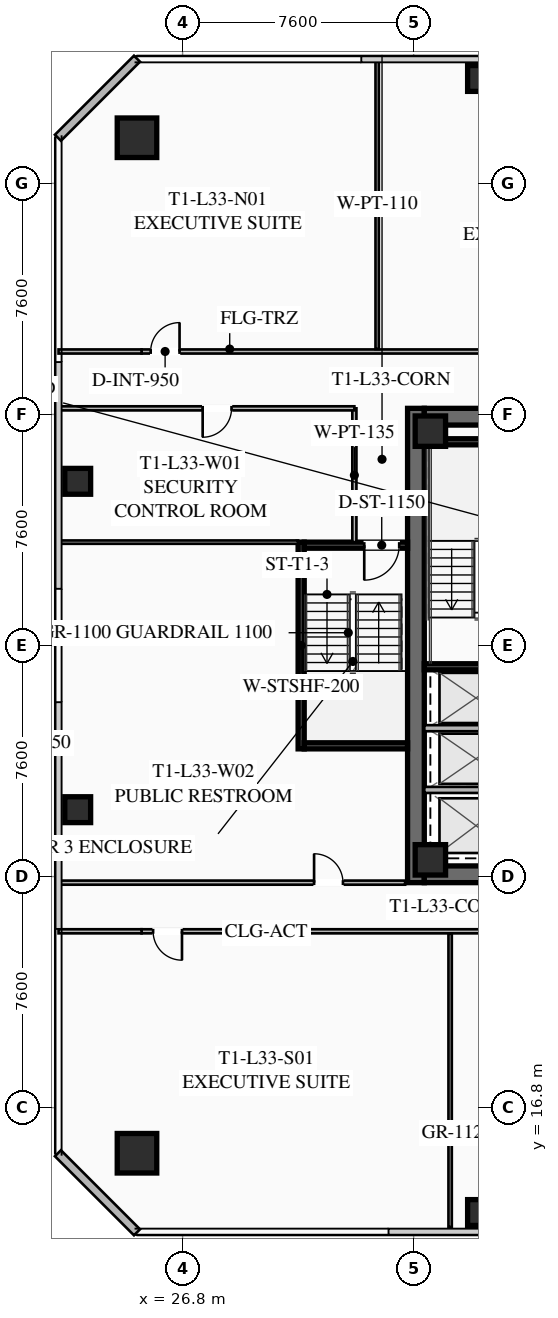
"""IFC4 building model, lengths in metres.
Left out: names, types, materials, properties, quantities, classifications, styles, units other than length and angle.
Written with IfcOpenShell. Run it as: python <this file> out.ifc"""

import sys

from ifc_helpers import new_model, si_unit, direction, frame, frame_2d, origin, origin_2d, place, context, subcontext, project, spatial, rectangle, hollow_rectangle, extrude, element, fill, save


model = new_model("IFC4")
c1 = context("Model", 3, precision=1e-05, world=origin(), true_north=direction((0.0, 1.0)))
c2 = subcontext(c1, "Body", "Model", "MODEL_VIEW")
j1 = project(units=[si_unit("LENGTHUNIT", "METRE"), si_unit("PLANEANGLEUNIT", "RADIAN")], contexts=[c1])
p1 = place(None, origin())
s1 = spatial("IfcSite", under=j1, at=p1, CompositionType="ELEMENT")
p2 = place(p1, origin())
s2 = spatial("IfcBuilding", under=s1, at=p2, CompositionType="ELEMENT")
p3 = place(p2, frame((0.0, 0.0, 125.05)))
s3 = spatial("IfcBuildingStorey", under=s2, at=p3, CompositionType="ELEMENT", Elevation=125.05)
p4 = place(p3, frame((34.475, 24.2, 0.0), z_axis=(0.0, 0.0, 1.0), x_axis=(0.0, 1.0, 0.0)))
e1 = element("IfcWall", 1, at=p4, inside=s3, PredefinedType="SHEAR", context=c2, shape_type="SweptSolid", body=[
    extrude(rectangle(XDim=15.6, YDim=0.55, at=frame_2d((7.8, 0.0))), origin(), (0.0, 0.0, 1.0), 3.55),
])
p5 = place(p3, frame((49.25, 24.475, 0.0), z_axis=(0.0, 0.0, 1.0), x_axis=(-1.0, 0.0, 0.0)))
e2 = element("IfcWall", 2, at=p5, inside=s3, PredefinedType="SHEAR", context=c2, shape_type="SweptSolid", body=[
    extrude(rectangle(XDim=14.5, YDim=0.55, at=frame_2d((7.25, 0.0))), origin(), (0.0, 0.0, 1.0), 3.55),
])
p6 = place(p5, frame((8.95, 0.0, 0.0)))
e3 = element("IfcOpeningElement", 3, at=p6, cuts=e2, PredefinedType="OPENING", context=c2, shape_type="SweptSolid", body=[
    extrude(rectangle(XDim=1.25, YDim=2.25, at=frame_2d((0.625, 1.125))), frame((0.0, 0.285, 0.0), z_axis=(0.0, -1.0, 0.0), x_axis=(1.0, 0.0, 0.0)), (0.0, 0.0, 1.0), 0.57),
])
p7 = place(p5, frame((3.9, 0.0, 0.0)))
e4 = element("IfcOpeningElement", 4, at=p7, cuts=e2, PredefinedType="OPENING", context=c2, shape_type="SweptSolid", body=[
    extrude(rectangle(XDim=1.25, YDim=2.25, at=frame_2d((0.625, 1.125))), frame((0.0, 0.285, 0.0), z_axis=(0.0, -1.0, 0.0), x_axis=(1.0, 0.0, 0.0)), (0.0, 0.0, 1.0), 0.57),
])
p8 = place(p3, frame((34.75, 39.525, 0.0), z_axis=(0.0, 0.0, 1.0), x_axis=(1.0, 0.0, 0.0)))
e5 = element("IfcWall", 5, at=p8, inside=s3, PredefinedType="SHEAR", context=c2, shape_type="SweptSolid", body=[
    extrude(rectangle(XDim=14.5, YDim=0.55, at=frame_2d((7.25, 0.0))), origin(), (0.0, 0.0, 1.0), 3.55),
])
p9 = place(p8, frame((4.3, 0.0, 0.0)))
e6 = element("IfcOpeningElement", 6, at=p9, cuts=e5, PredefinedType="OPENING", context=c2, shape_type="SweptSolid", body=[
    extrude(rectangle(XDim=1.25, YDim=2.25, at=frame_2d((0.625, 1.125))), frame((0.0, 0.285, 0.0), z_axis=(0.0, -1.0, 0.0), x_axis=(1.0, 0.0, 0.0)), (0.0, 0.0, 1.0), 0.57),
])
p10 = place(p8, frame((9.35, 0.0, 0.0)))
e7 = element("IfcOpeningElement", 7, at=p10, cuts=e5, PredefinedType="OPENING", context=c2, shape_type="SweptSolid", body=[
    extrude(rectangle(XDim=1.25, YDim=2.25, at=frame_2d((0.625, 1.125))), frame((0.0, 0.285, 0.0), z_axis=(0.0, -1.0, 0.0), x_axis=(1.0, 0.0, 0.0)), (0.0, 0.0, 1.0), 0.57),
])
for number, where, z_axis, x_axis in (
    (8, (34.95, 24.95, 0.0), (0.0, 0.0, 1.0), (1.0, 0.0, 0.0)),
    (9, (34.95, 39.05, 0.0), (0.0, 0.0, 1.0), (1.0, 0.0, 0.0)),
):
    element("IfcColumn", number, at=place(p3, frame(where, z_axis=z_axis, x_axis=x_axis)), inside=s3, PredefinedType="COLUMN", context=c2, shape_type="SweptSolid", body=[
        extrude(hollow_rectangle(XDim=1.0, YDim=1.0, WallThickness=0.04, at=origin_2d()), origin(), (0.0, 0.0, 1.0), 3.37),
    ])
for number, where, z_axis, x_axis in (
    (10, (25.3, 15.3, 0.0), (0.0, 0.0, 1.0), (1.0, 0.0, 0.0)),
    (11, (25.3, 48.7, 0.0), (0.0, 0.0, 1.0), (1.0, 0.0, 0.0)),
):
    element("IfcColumn", number, at=place(p3, frame(where, z_axis=z_axis, x_axis=x_axis)), inside=s3, PredefinedType="COLUMN", context=c2, shape_type="SweptSolid", body=[
        extrude(hollow_rectangle(XDim=1.3, YDim=1.3, WallThickness=0.05, at=origin_2d()), origin(), (0.0, 0.0, 1.0), 3.37),
    ])
for number, where, z_axis, x_axis in (
    (12, (36.6, 13.35, 0.0), (0.0, 0.0, 1.0), (1.0, 0.0, 0.0)),
    (13, (36.6, 50.65, 0.0), (0.0, 0.0, 1.0), (1.0, 0.0, 0.0)),
    (14, (23.35, 37.4, 0.0), (0.0, 0.0, 1.0), (1.0, 0.0, 0.0)),
    (15, (23.35, 26.6, 0.0), (0.0, 0.0, 1.0), (1.0, 0.0, 0.0)),
):
    element("IfcColumn", number, at=place(p3, frame(where, z_axis=z_axis, x_axis=x_axis)), inside=s3, PredefinedType="COLUMN", context=c2, shape_type="SweptSolid", body=[
        extrude(hollow_rectangle(XDim=0.85, YDim=0.85, WallThickness=0.035, at=origin_2d()), origin(), (0.0, 0.0, 1.0), 3.37),
    ])
for number, where, z_axis, x_axis in (
    (16, (25.3, 12.7, 0.0), (0.0, 0.0, 1.0), (-0.707, 0.707, 0.0)),
    (17, (22.7, 48.7, 0.0), (0.0, 0.0, 1.0), (0.707, 0.707, 0.0)),
):
    element("IfcWall", number, at=place(p3, frame(where, z_axis=z_axis, x_axis=x_axis)), inside=s3, PredefinedType="SOLIDWALL", context=c2, shape_type="SweptSolid", body=[
        extrude(rectangle(XDim=3.677, YDim=0.28, at=frame_2d((1.838, 0.0))), origin(), (0.0, 0.0, 1.0), 3.37),
    ])
for number, where, z_axis, x_axis in (
    (18, (34.75, 31.3, 0.0), (0.0, 0.0, 1.0), (1.0, 0.0, 0.0)),
    (19, (34.75, 38.7, 0.0), (0.0, 0.0, 1.0), (1.0, 0.0, 0.0)),
):
    element("IfcWall", number, at=place(p3, frame(where, z_axis=z_axis, x_axis=x_axis)), inside=s3, PredefinedType="SHEAR", context=c2, shape_type="SweptSolid", body=[
        extrude(rectangle(XDim=3.55, YDim=0.2, at=frame_2d((1.775, 0.0))), origin(), (0.0, 0.0, 1.0), 3.37),
    ])
for number, where, z_axis, x_axis in (
    (20, (34.75, 27.25, 0.0), (0.0, 0.0, 1.0), (1.0, 0.0, 0.0)),
    (21, (34.75, 29.28, 0.0), (0.0, 0.0, 1.0), (1.0, 0.0, 0.0)),
):
    element("IfcWall", number, at=place(p3, frame(where, z_axis=z_axis, x_axis=x_axis)), inside=s3, PredefinedType="SOLIDWALL", context=c2, shape_type="SweptSolid", body=[
        extrude(rectangle(XDim=3.2, YDim=0.2, at=frame_2d((1.6, 0.0))), origin(), (0.0, 0.0, 1.0), 3.37),
    ])
p11 = place(p3, frame((30.7, 28.6, 0.0), z_axis=(0.0, 0.0, 1.0), x_axis=(0.0, 1.0, 0.0)))
e22 = element("IfcWall", 22, at=p11, inside=s3, PredefinedType="SHEAR", context=c2, shape_type="SweptSolid", body=[
    extrude(rectangle(XDim=6.8, YDim=0.2, at=frame_2d((3.4, 0.0))), origin(), (0.0, 0.0, 1.0), 3.37),
])
p12 = place(p3, frame((34.2, 35.3, 0.0), z_axis=(0.0, 0.0, 1.0), x_axis=(-1.0, 0.0, 0.0)))
e23 = element("IfcWall", 23, at=p12, inside=s3, PredefinedType="SHEAR", context=c2, shape_type="SweptSolid", body=[
    extrude(rectangle(XDim=3.4, YDim=0.2, at=frame_2d((1.7, 0.0))), origin(), (0.0, 0.0, 1.0), 3.37),
])
p13 = place(p12, frame((0.275, 0.0, 0.0)))
e24 = element("IfcOpeningElement", 24, at=p13, cuts=e23, PredefinedType="OPENING", context=c2, shape_type="SweptSolid", body=[
    extrude(rectangle(XDim=1.15, YDim=2.2, at=frame_2d((0.575, 1.1))), frame((0.0, 0.11, 0.0), z_axis=(0.0, -1.0, 0.0), x_axis=(1.0, 0.0, 0.0)), (0.0, 0.0, 1.0), 0.22),
])
p14 = place(p3, frame((30.8, 28.7, 0.0), z_axis=(0.0, 0.0, 1.0), x_axis=(1.0, 0.0, 0.0)))
e25 = element("IfcWall", 25, at=p14, inside=s3, PredefinedType="SHEAR", context=c2, shape_type="SweptSolid", body=[
    extrude(rectangle(XDim=3.4, YDim=0.2, at=frame_2d((1.7, 0.0))), origin(), (0.0, 0.0, 1.0), 3.37),
])
p15 = place(p3, frame((32.45, 35.4, 0.0), z_axis=(0.0, 0.0, 1.0), x_axis=(0.0, 1.0, 0.0)))
e26 = element("IfcWall", 26, at=p15, inside=s3, PredefinedType="PARTITIONING", context=c2, shape_type="SweptSolid", body=[
    extrude(rectangle(XDim=4.4, YDim=0.135, at=frame_2d((2.2, 0.0))), origin(), (0.0, 0.0, 1.0), 2.723),
])
p16 = place(p3, frame((25.45, 41.67, 0.0), z_axis=(0.0, 0.0, 1.0), x_axis=(1.0, 0.0, 0.0)))
e27 = element("IfcWall", 27, at=p16, inside=s3, PredefinedType="PARTITIONING", context=c2, shape_type="SweptSolid", body=[
    extrude(rectangle(XDim=33.1, YDim=0.135, at=frame_2d((16.55, 0.0))), origin(), (0.0, 0.0, 1.0), 2.723),
])
p17 = place(p16, frame((0.3, 0.0, 0.0)))
e28 = element("IfcOpeningElement", 28, at=p17, cuts=e27, PredefinedType="OPENING", context=c2, shape_type="SweptSolid", body=[
    extrude(rectangle(XDim=0.95, YDim=2.05, at=frame_2d((0.475, 1.025))), frame((0.0, 0.077, 0.0), z_axis=(0.0, -1.0, 0.0), x_axis=(1.0, 0.0, 0.0)), (0.0, 0.0, 1.0), 0.155),
])
p18 = place(p16, frame((16.363, 0.0, 0.0)))
e29 = element("IfcOpeningElement", 29, at=p18, cuts=e27, PredefinedType="OPENING", context=c2, shape_type="SweptSolid", body=[
    extrude(rectangle(XDim=0.95, YDim=2.05, at=frame_2d((0.475, 1.025))), frame((0.0, 0.077, 0.0), z_axis=(0.0, -1.0, 0.0), x_axis=(1.0, 0.0, 0.0)), (0.0, 0.0, 1.0), 0.155),
])
p19 = place(p16, frame((31.85, 0.0, 0.0)))
e30 = element("IfcOpeningElement", 30, at=p19, cuts=e27, PredefinedType="OPENING", context=c2, shape_type="SweptSolid", body=[
    extrude(rectangle(XDim=0.95, YDim=2.05, at=frame_2d((0.475, 1.025))), frame((0.0, 0.077, 0.0), z_axis=(0.0, -1.0, 0.0), x_axis=(1.0, 0.0, 0.0)), (0.0, 0.0, 1.0), 0.155),
])
p20 = place(p3, frame((22.72, 41.67, 0.0), z_axis=(0.0, 0.0, 1.0), x_axis=(1.0, 0.0, 0.0)))
e31 = element("IfcWall", 31, at=p20, inside=s3, PredefinedType="PARTITIONING", context=c2, shape_type="SweptSolid", body=[
    extrude(rectangle(XDim=2.73, YDim=0.135, at=frame_2d((1.365, 0.0))), origin(), (0.0, 0.0, 1.0), 2.723),
])
p21 = place(p3, frame((33.2, 41.75, 0.0), z_axis=(0.0, 0.0, 1.0), x_axis=(0.0, 1.0, 0.0)))
e32 = element("IfcWall", 32, at=p21, inside=s3, PredefinedType="PARTITIONING", context=c2, shape_type="SweptSolid", body=[
    extrude(rectangle(XDim=9.53, YDim=0.11, at=frame_2d((4.765, 0.0))), origin(), (0.0, 0.0, 1.0), 2.723),
])
p22 = place(p3, frame((58.55, 22.6, 0.0), z_axis=(0.0, 0.0, 1.0), x_axis=(-1.0, 0.0, 0.0)))
e33 = element("IfcWall", 33, at=p22, inside=s3, PredefinedType="PARTITIONING", context=c2, shape_type="SweptSolid", body=[
    extrude(rectangle(XDim=33.1, YDim=0.135, at=frame_2d((16.55, 0.0))), origin(), (0.0, 0.0, 1.0), 2.723),
])
p23 = place(p22, frame((31.77, 0.0, 0.0)))
e34 = element("IfcOpeningElement", 34, at=p23, cuts=e33, PredefinedType="OPENING", context=c2, shape_type="SweptSolid", body=[
    extrude(rectangle(XDim=0.95, YDim=2.05, at=frame_2d((0.475, 1.025))), frame((0.0, 0.077, 0.0), z_axis=(0.0, -1.0, 0.0), x_axis=(1.0, 0.0, 0.0)), (0.0, 0.0, 1.0), 0.155),
])
p24 = place(p22, frame((15.838, 0.0, 0.0)))
e35 = element("IfcOpeningElement", 35, at=p24, cuts=e33, PredefinedType="OPENING", context=c2, shape_type="SweptSolid", body=[
    extrude(rectangle(XDim=0.95, YDim=2.05, at=frame_2d((0.475, 1.025))), frame((0.0, 0.077, 0.0), z_axis=(0.0, -1.0, 0.0), x_axis=(1.0, 0.0, 0.0)), (0.0, 0.0, 1.0), 0.155),
])
p25 = place(p22, frame((0.38, 0.0, 0.0)))
e36 = element("IfcOpeningElement", 36, at=p25, cuts=e33, PredefinedType="OPENING", context=c2, shape_type="SweptSolid", body=[
    extrude(rectangle(XDim=0.95, YDim=2.05, at=frame_2d((0.475, 1.025))), frame((0.0, 0.077, 0.0), z_axis=(0.0, -1.0, 0.0), x_axis=(1.0, 0.0, 0.0)), (0.0, 0.0, 1.0), 0.155),
])
p26 = place(p3, frame((22.72, 22.6, 0.0), z_axis=(0.0, 0.0, 1.0), x_axis=(1.0, 0.0, 0.0)))
e37 = element("IfcWall", 37, at=p26, inside=s3, PredefinedType="PARTITIONING", context=c2, shape_type="SweptSolid", body=[
    extrude(rectangle(XDim=2.73, YDim=0.135, at=frame_2d((1.365, 0.0))), origin(), (0.0, 0.0, 1.0), 2.723),
])
p27 = place(p3, frame((35.6, 12.87, 0.0), z_axis=(0.0, 0.0, 1.0), x_axis=(0.0, 1.0, 0.0)))
e38 = element("IfcWall", 38, at=p27, inside=s3, PredefinedType="PARTITIONING", context=c2, shape_type="SweptSolid", body=[
    extrude(rectangle(XDim=9.65, YDim=0.11, at=frame_2d((4.825, 0.0))), origin(), (0.0, 0.0, 1.0), 2.723),
])
p28 = place(p3, frame((32.45, 39.8, 0.0), z_axis=(0.0, 0.0, 1.0), x_axis=(-1.0, 0.0, 0.0)))
e39 = element("IfcWall", 39, at=p28, inside=s3, PredefinedType="PARTITIONING", context=c2, shape_type="SweptSolid", body=[
    extrude(rectangle(XDim=9.73, YDim=0.135, at=frame_2d((4.865, 0.0))), origin(), (0.0, 0.0, 1.0), 2.723),
])
p29 = place(p28, frame((4.04, 0.0, 0.0)))
e40 = element("IfcOpeningElement", 40, at=p29, cuts=e39, PredefinedType="OPENING", context=c2, shape_type="SweptSolid", body=[
    extrude(rectangle(XDim=0.95, YDim=2.05, at=frame_2d((0.475, 1.025))), frame((0.0, 0.077, 0.0), z_axis=(0.0, -1.0, 0.0), x_axis=(1.0, 0.0, 0.0)), (0.0, 0.0, 1.0), 0.155),
])
p30 = place(p3, frame((22.72, 24.2, 0.0), z_axis=(0.0, 0.0, 1.0), x_axis=(1.0, 0.0, 0.0)))
e41 = element("IfcWall", 41, at=p30, inside=s3, PredefinedType="PARTITIONING", context=c2, shape_type="SweptSolid", body=[
    extrude(rectangle(XDim=11.4, YDim=0.135, at=frame_2d((5.7, 0.0))), origin(), (0.0, 0.0, 1.0), 2.723),
])
p31 = place(p30, frame((8.405, 0.0, 0.0)))
e42 = element("IfcOpeningElement", 42, at=p31, cuts=e41, PredefinedType="OPENING", context=c2, shape_type="SweptSolid", body=[
    extrude(rectangle(XDim=0.95, YDim=2.05, at=frame_2d((0.475, 1.025))), frame((0.0, 0.077, 0.0), z_axis=(0.0, -1.0, 0.0), x_axis=(1.0, 0.0, 0.0)), (0.0, 0.0, 1.0), 0.155),
])
p32 = place(p3, frame((30.6, 35.4, 0.0), z_axis=(0.0, 0.0, 1.0), x_axis=(-1.0, 0.0, 0.0)))
e43 = element("IfcWall", 43, at=p32, inside=s3, PredefinedType="PARTITIONING", context=c2, shape_type="SweptSolid", body=[
    extrude(rectangle(XDim=7.88, YDim=0.11, at=frame_2d((3.94, 0.0))), origin(), (0.0, 0.0, 1.0), 2.723),
])
p33 = place(p13, origin())
e44 = element("IfcDoor", 44, at=p33, inside=s3, OperationType="SINGLE_SWING_RIGHT", PredefinedType="DOOR", context=c2, shape_type="SweptSolid", body=[
    extrude(rectangle(XDim=1.15, YDim=2.2, at=frame_2d((0.575, 1.1))), frame((0.0, 0.025, 0.0), z_axis=(0.0, -1.0, 0.0), x_axis=(1.0, 0.0, 0.0)), (0.0, 0.0, 1.0), 0.05),
])
fill(e24, e44)
p34 = place(p17, origin())
e45 = element("IfcDoor", 45, at=p34, inside=s3, OperationType="SINGLE_SWING_RIGHT", PredefinedType="DOOR", context=c2, shape_type="SweptSolid", body=[
    extrude(rectangle(XDim=0.95, YDim=2.05, at=frame_2d((0.475, 1.025))), frame((0.0, 0.025, 0.0), z_axis=(0.0, -1.0, 0.0), x_axis=(1.0, 0.0, 0.0)), (0.0, 0.0, 1.0), 0.05),
])
fill(e28, e45)
p35 = place(p23, origin())
e46 = element("IfcDoor", 46, at=p35, inside=s3, OperationType="SINGLE_SWING_LEFT", PredefinedType="DOOR", context=c2, shape_type="SweptSolid", body=[
    extrude(rectangle(XDim=0.95, YDim=2.05, at=frame_2d((0.475, 1.025))), frame((0.0, 0.025, 0.0), z_axis=(0.0, -1.0, 0.0), x_axis=(1.0, 0.0, 0.0)), (0.0, 0.0, 1.0), 0.05),
])
fill(e34, e46)
p36 = place(p29, origin())
e47 = element("IfcDoor", 47, at=p36, inside=s3, OperationType="SINGLE_SWING_RIGHT", PredefinedType="DOOR", context=c2, shape_type="SweptSolid", body=[
    extrude(rectangle(XDim=0.95, YDim=2.05, at=frame_2d((0.475, 1.025))), frame((0.0, 0.025, 0.0), z_axis=(0.0, -1.0, 0.0), x_axis=(1.0, 0.0, 0.0)), (0.0, 0.0, 1.0), 0.05),
])
fill(e40, e47)
p37 = place(p31, origin())
e48 = element("IfcDoor", 48, at=p37, inside=s3, OperationType="SINGLE_SWING_LEFT", PredefinedType="DOOR", context=c2, shape_type="SweptSolid", body=[
    extrude(rectangle(XDim=0.95, YDim=2.05, at=frame_2d((0.475, 1.025))), frame((0.0, 0.025, 0.0), z_axis=(0.0, -1.0, 0.0), x_axis=(1.0, 0.0, 0.0)), (0.0, 0.0, 1.0), 0.05),
])
fill(e42, e48)
save(model, sys.argv[1])
